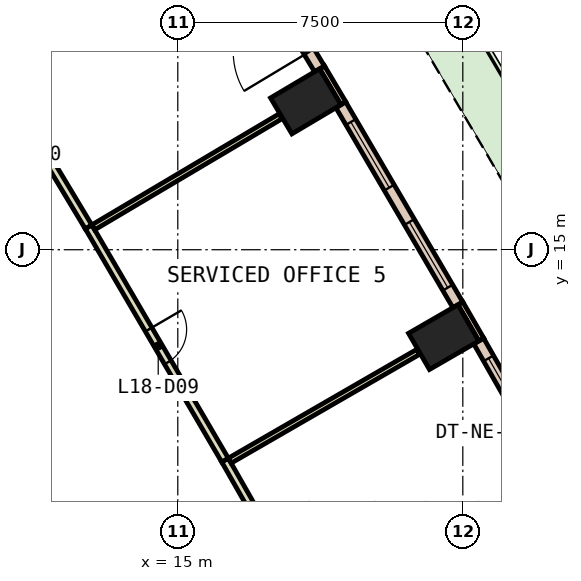
"""IFC4 building model, lengths in metres.
Left out: names, types, materials, properties, quantities, classifications, styles, units other than length and angle.
Written with IfcOpenShell. Run it as: python <this file> out.ifc"""

import sys

from ifc_helpers import new_model, si_unit, direction, frame, frame_2d, origin, origin_2d, place, context, subcontext, project, spatial, polyline, rectangle, outline, extrude, element, fill, save


model = new_model("IFC4")
c1 = context("Model", 3, precision=1e-05, world=origin(), true_north=direction((0.0, 1.0)))
c2 = subcontext(c1, "Body", "Model", "MODEL_VIEW")
j1 = project(units=[si_unit("LENGTHUNIT", "METRE"), si_unit("PLANEANGLEUNIT", "RADIAN")], contexts=[c1])
p1 = place(None, origin())
s1 = spatial("IfcSite", under=j1, at=p1, CompositionType="ELEMENT")
p2 = place(p1, origin())
s2 = spatial("IfcBuilding", under=s1, at=p2, CompositionType="ELEMENT")
p3 = place(p2, frame((0.0, 0.0, 86.6)))
s3 = spatial("IfcBuildingStorey", under=s2, at=p3, CompositionType="ELEMENT", Elevation=86.6)
for number, where, z_axis, x_axis in (
    (1, (21.997, 12.7, 0.0), (0.0, 0.0, 1.0), (-0.5, 0.866, 0.0)),
    (2, (18.367, 18.904, 0.0), (0.0, 0.0, 1.0), (-0.51, 0.86, 0.0)),
):
    element("IfcColumn", number, at=place(p3, frame(where, z_axis=z_axis, x_axis=x_axis)), inside=s3, PredefinedType="COLUMN", context=c2, shape_type="SweptSolid", body=[
        extrude(rectangle(XDim=1.1, YDim=1.5, at=origin_2d()), origin(), (0.0, 0.0, 1.0), 3.8),
    ])
p4 = place(p3, frame((0.0, 0.0, -0.6)))
e3 = element("IfcWall", 3, at=p4, inside=s3, PredefinedType="SHEAR", context=c2, shape_type="SweptSolid", body=[
    extrude(outline(polyline([(8.517, 11.748), (7.738, 11.298), (12.817, 2.5), (13.856, 2.5), (8.517, 11.748)])), origin(), (0.0, 0.0, 1.0), 4.4),
])
p5 = place(p3, frame((22.986, 12.636, 0.0), z_axis=(0.0, 0.0, 1.0), x_axis=(-0.499837685251, 0.86611909597, 0.0)))
e4 = element("IfcWall", 4, at=p5, inside=s3, PredefinedType="STANDARD", context=c2, shape_type="SweptSolid", body=[
    extrude(rectangle(XDim=1.1, YDim=0.15, at=frame_2d((0.55, 0.0))), origin(), (0.0, 0.0, 1.0), 3.8),
])
p6 = place(p3, frame((19.357, 18.852, 0.0), z_axis=(0.0, 0.0, 1.0), x_axis=(-0.510082245696, 0.860125631885, 0.0)))
e5 = element("IfcWall", 5, at=p6, inside=s3, PredefinedType="STANDARD", context=c2, shape_type="SweptSolid", body=[
    extrude(rectangle(XDim=1.1, YDim=0.15, at=frame_2d((0.55, 0.0))), origin(), (0.0, 0.0, 1.0), 3.8),
])
p7 = place(p3, frame((25.936, 7.299, 0.0), z_axis=(0.0, 0.0, 1.0), x_axis=(-0.49492259535, 0.868937065967, 0.0)))
e6 = element("IfcWall", 6, at=p7, inside=s3, PredefinedType="STANDARD", context=c2, shape_type="SweptSolid", body=[
    extrude(rectangle(XDim=6.098, YDim=0.3, at=frame_2d((3.049, 0.0))), origin(), (0.0, 0.0, 1.0), 3.8),
])
p8 = place(p7, frame((0.525, 0.0, 0.0)))
e7 = element("IfcOpeningElement", 7, at=p8, cuts=e6, PredefinedType="OPENING", context=c2, shape_type="SweptSolid", body=[
    extrude(rectangle(XDim=2.0, YDim=2.4, at=frame_2d((1.0, 1.2))), frame((0.0, 0.16, 0.0), z_axis=(0.0, -1.0, 0.0), x_axis=(1.0, 0.0, 0.0)), (0.0, 0.0, 1.0), 0.32),
])
p9 = place(p7, frame((3.574, 0.0, 0.9)))
e8 = element("IfcOpeningElement", 8, at=p9, cuts=e6, PredefinedType="OPENING", context=c2, shape_type="SweptSolid", body=[
    extrude(rectangle(XDim=2.0, YDim=2.6, at=frame_2d((1.0, 1.3))), frame((0.0, 0.16, 0.0), z_axis=(0.0, -1.0, 0.0), x_axis=(1.0, 0.0, 0.0)), (0.0, 0.0, 1.0), 0.32),
])
p10 = place(p3, frame((22.369, 13.549, 0.0), z_axis=(0.0, 0.0, 1.0), x_axis=(-0.504998117261, 0.863120444413, 0.0)))
e9 = element("IfcWall", 9, at=p10, inside=s3, PredefinedType="STANDARD", context=c2, shape_type="SweptSolid", body=[
    extrude(rectangle(XDim=6.099, YDim=0.3, at=frame_2d((3.049, 0.0))), origin(), (0.0, 0.0, 1.0), 3.8),
])
p11 = place(p10, frame((0.525, 0.0, 0.9)))
e10 = element("IfcOpeningElement", 10, at=p11, cuts=e9, PredefinedType="OPENING", context=c2, shape_type="SweptSolid", body=[
    extrude(rectangle(XDim=2.0, YDim=2.6, at=frame_2d((1.0, 1.3))), frame((0.0, 0.16, 0.0), z_axis=(0.0, -1.0, 0.0), x_axis=(1.0, 0.0, 0.0)), (0.0, 0.0, 1.0), 0.32),
])
p12 = place(p10, frame((3.574, 0.0, 0.9)))
e11 = element("IfcOpeningElement", 11, at=p12, cuts=e9, PredefinedType="OPENING", context=c2, shape_type="SweptSolid", body=[
    extrude(rectangle(XDim=2.0, YDim=2.6, at=frame_2d((1.0, 1.3))), frame((0.0, 0.16, 0.0), z_axis=(0.0, -1.0, 0.0), x_axis=(1.0, 0.0, 0.0)), (0.0, 0.0, 1.0), 0.32),
])
p13 = place(p3, frame((18.729, 19.757, 0.0), z_axis=(0.0, 0.0, 1.0), x_axis=(-0.515102053092, 0.857128855483, 0.0)))
e12 = element("IfcWall", 12, at=p13, inside=s3, PredefinedType="STANDARD", context=c2, shape_type="SweptSolid", body=[
    extrude(rectangle(XDim=6.098, YDim=0.3, at=frame_2d((3.049, 0.0))), origin(), (0.0, 0.0, 1.0), 3.8),
])
p14 = place(p13, frame((0.525, 0.0, 0.0)))
e13 = element("IfcOpeningElement", 13, at=p14, cuts=e12, PredefinedType="OPENING", context=c2, shape_type="SweptSolid", body=[
    extrude(rectangle(XDim=2.0, YDim=2.4, at=frame_2d((1.0, 1.2))), frame((0.0, 0.16, 0.0), z_axis=(0.0, -1.0, 0.0), x_axis=(1.0, 0.0, 0.0)), (0.0, 0.0, 1.0), 0.32),
])
p15 = place(p13, frame((3.574, 0.0, 0.9)))
e14 = element("IfcOpeningElement", 14, at=p15, cuts=e12, PredefinedType="OPENING", context=c2, shape_type="SweptSolid", body=[
    extrude(rectangle(XDim=2.0, YDim=2.6, at=frame_2d((1.0, 1.3))), frame((0.0, 0.16, 0.0), z_axis=(0.0, -1.0, 0.0), x_axis=(1.0, 0.0, 0.0)), (0.0, 0.0, 1.0), 0.32),
])
p16 = place(p3, frame((16.243, 9.465, 0.0), z_axis=(0.0, 0.0, 1.0), x_axis=(0.495081262009, -0.868846674625, 0.0)))
e15 = element("IfcWall", 15, at=p16, inside=s3, PredefinedType="PARTITIONING", context=c2, shape_type="SweptSolid", body=[
    extrude(rectangle(XDim=7.112, YDim=0.2, at=frame_2d((3.556, 0.0))), origin(), (0.0, 0.0, 1.0), 3.8),
])
p17 = place(p16, frame((3.131, 0.0, 0.0)))
e16 = element("IfcOpeningElement", 16, at=p17, cuts=e15, PredefinedType="OPENING", context=c2, shape_type="SweptSolid", body=[
    extrude(rectangle(XDim=1.0, YDim=2.1, at=frame_2d((0.5, 1.05))), frame((0.0, 0.11, 0.0), z_axis=(0.0, -1.0, 0.0), x_axis=(1.0, 0.0, 0.0)), (0.0, 0.0, 1.0), 0.22),
])
p18 = place(p3, frame((12.652, 15.602, 0.0), z_axis=(0.0, 0.0, 1.0), x_axis=(0.504914693075, -0.863169249172, 0.0)))
e17 = element("IfcWall", 17, at=p18, inside=s3, PredefinedType="PARTITIONING", context=c2, shape_type="SweptSolid", body=[
    extrude(rectangle(XDim=7.11, YDim=0.2, at=frame_2d((3.555, 0.0))), origin(), (0.0, 0.0, 1.0), 3.8),
])
p19 = place(p18, frame((3.13, 0.0, 0.0)))
e18 = element("IfcOpeningElement", 18, at=p19, cuts=e17, PredefinedType="OPENING", context=c2, shape_type="SweptSolid", body=[
    extrude(rectangle(XDim=1.0, YDim=2.1, at=frame_2d((0.5, 1.05))), frame((0.0, 0.11, 0.0), z_axis=(0.0, -1.0, 0.0), x_axis=(1.0, 0.0, 0.0)), (0.0, 0.0, 1.0), 0.22),
])
p20 = place(p3, frame((8.989, 21.696, 0.0), z_axis=(0.0, 0.0, 1.0), x_axis=(0.515000602442, -0.857189815318, 0.0)))
e19 = element("IfcWall", 19, at=p20, inside=s3, PredefinedType="PARTITIONING", context=c2, shape_type="SweptSolid", body=[
    extrude(rectangle(XDim=7.11, YDim=0.2, at=frame_2d((3.555, 0.0))), origin(), (0.0, 0.0, 1.0), 3.8),
])
p21 = place(p20, frame((3.13, 0.0, 0.0)))
e20 = element("IfcOpeningElement", 20, at=p21, cuts=e19, PredefinedType="OPENING", context=c2, shape_type="SweptSolid", body=[
    extrude(rectangle(XDim=1.0, YDim=2.1, at=frame_2d((0.5, 1.05))), frame((0.0, 0.11, 0.0), z_axis=(0.0, -1.0, 0.0), x_axis=(1.0, 0.0, 0.0)), (0.0, 0.0, 1.0), 0.22),
])
p22 = place(p3, frame((16.367, 9.45, 0.0), z_axis=(0.0, 0.0, 1.0), x_axis=(0.866061440635, 0.499937577149, 0.0)))
e21 = element("IfcWall", 21, at=p22, inside=s3, PredefinedType="PARTITIONING", context=c2, shape_type="SweptSolid", body=[
    extrude(rectangle(XDim=5.731, YDim=0.15, at=frame_2d((2.865, 0.0))), origin(), (0.0, 0.0, 1.0), 3.8),
])
p23 = place(p3, frame((12.776, 15.589, 0.0), z_axis=(0.0, 0.0, 1.0), x_axis=(0.860225086153, 0.509914503768, 0.0)))
e22 = element("IfcWall", 22, at=p23, inside=s3, PredefinedType="PARTITIONING", context=c2, shape_type="SweptSolid", body=[
    extrude(rectangle(XDim=5.73, YDim=0.15, at=frame_2d((2.865, 0.0))), origin(), (0.0, 0.0, 1.0), 3.8),
])
p24 = place(p9, origin())
e23 = element("IfcWindow", 23, at=p24, inside=s3, PartitioningType="SINGLE_PANEL", PredefinedType="WINDOW", context=c2, shape_type="SweptSolid", body=[
    extrude(rectangle(XDim=2.0, YDim=2.6, at=frame_2d((1.0, 1.3))), frame((0.0, 0.03, 0.0), z_axis=(0.0, -1.0, 0.0), x_axis=(1.0, 0.0, 0.0)), (0.0, 0.0, 1.0), 0.06),
])
fill(e8, e23)
p25 = place(p11, origin())
e24 = element("IfcWindow", 24, at=p25, inside=s3, PartitioningType="SINGLE_PANEL", PredefinedType="WINDOW", context=c2, shape_type="SweptSolid", body=[
    extrude(rectangle(XDim=2.0, YDim=2.6, at=frame_2d((1.0, 1.3))), frame((0.0, 0.03, 0.0), z_axis=(0.0, -1.0, 0.0), x_axis=(1.0, 0.0, 0.0)), (0.0, 0.0, 1.0), 0.06),
])
fill(e10, e24)
p26 = place(p12, origin())
e25 = element("IfcWindow", 25, at=p26, inside=s3, PartitioningType="SINGLE_PANEL", PredefinedType="WINDOW", context=c2, shape_type="SweptSolid", body=[
    extrude(rectangle(XDim=2.0, YDim=2.6, at=frame_2d((1.0, 1.3))), frame((0.0, 0.03, 0.0), z_axis=(0.0, -1.0, 0.0), x_axis=(1.0, 0.0, 0.0)), (0.0, 0.0, 1.0), 0.06),
])
fill(e11, e25)
p27 = place(p14, origin())
e26 = element("IfcDoor", 26, at=p27, inside=s3, OperationType="SLIDING_TO_LEFT", PredefinedType="DOOR", context=c2, shape_type="SweptSolid", body=[
    extrude(rectangle(XDim=2.0, YDim=2.4, at=frame_2d((1.0, 1.2))), frame((0.0, 0.025, 0.0), z_axis=(0.0, -1.0, 0.0), x_axis=(1.0, 0.0, 0.0)), (0.0, 0.0, 1.0), 0.05),
])
fill(e13, e26)
p28 = place(p19, origin())
e27 = element("IfcDoor", 27, at=p28, inside=s3, OperationType="SINGLE_SWING_LEFT", PredefinedType="DOOR", context=c2, shape_type="SweptSolid", body=[
    extrude(rectangle(XDim=1.0, YDim=2.1, at=frame_2d((0.5, 1.05))), frame((0.0, 0.025, 0.0), z_axis=(0.0, -1.0, 0.0), x_axis=(1.0, 0.0, 0.0)), (0.0, 0.0, 1.0), 0.05),
])
fill(e18, e27)
save(model, sys.argv[1])
